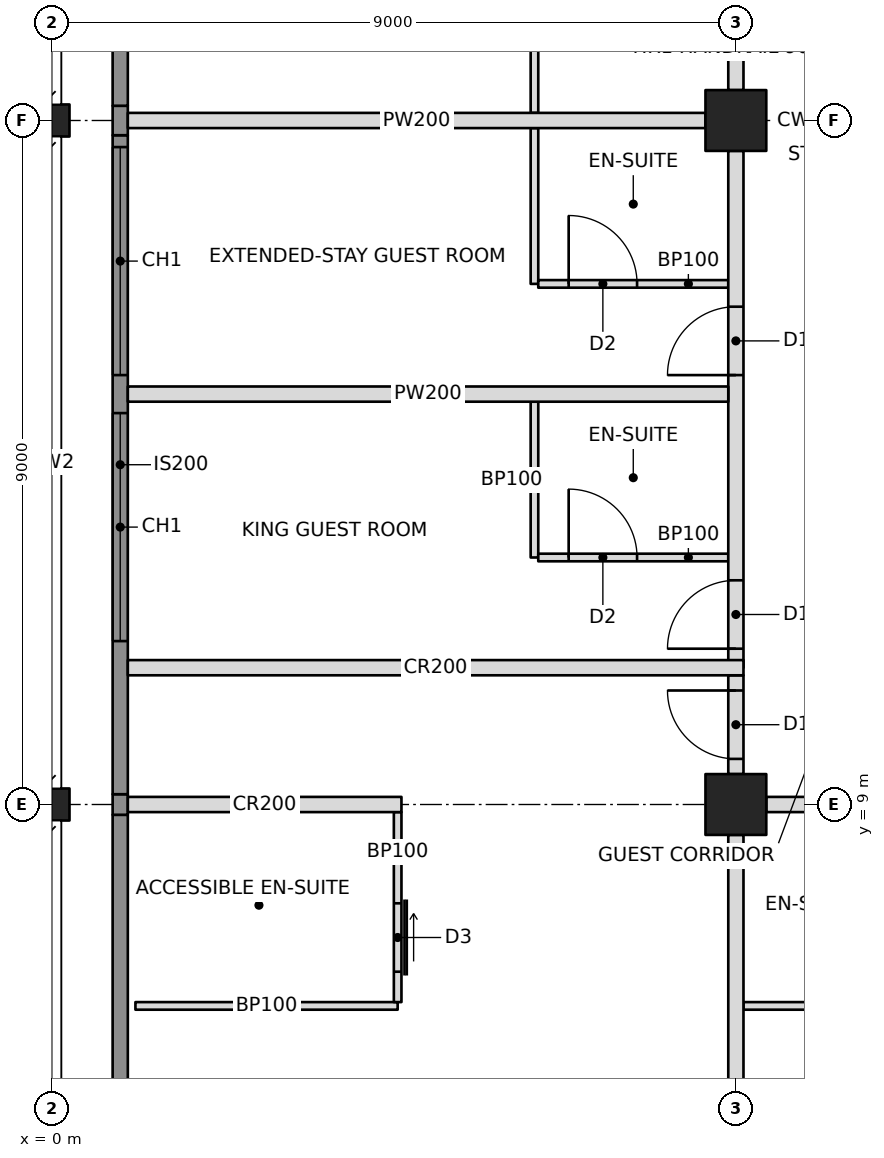
"""IFC4 building model, lengths in metres.
Left out: names, types, materials, properties, quantities, classifications, styles, units other than length and angle.
Written with IfcOpenShell. Run it as: python <this file> out.ifc"""

import sys

from ifc_helpers import new_model, si_unit, direction, frame, frame_2d, origin, origin_2d, place, context, subcontext, project, spatial, rectangle, hollow_rectangle, i_section, extrude, element, fill, save


model = new_model("IFC4")
c1 = context("Model", 3, precision=1e-05, world=origin(), true_north=direction((0.0, 1.0)))
c2 = subcontext(c1, "Body", "Model", "MODEL_VIEW")
j1 = project(units=[si_unit("LENGTHUNIT", "METRE"), si_unit("PLANEANGLEUNIT", "RADIAN")], contexts=[c1])
p1 = place(None, origin())
s1 = spatial("IfcSite", under=j1, at=p1, CompositionType="ELEMENT")
p2 = place(p1, origin())
s2 = spatial("IfcBuilding", under=s1, at=p2, CompositionType="ELEMENT")
p3 = place(p2, frame((0.0, 0.0, 237.4)))
s3 = spatial("IfcBuildingStorey", under=s2, at=p3, CompositionType="ELEMENT", Elevation=237.4)
for number, where, z_axis, x_axis in (
    (1, (0.0, 9.0, 0.0), (0.0, 0.0, 1.0), (0.0, 1.0, 0.0)),
    (2, (0.0, 18.0, 0.0), (0.0, 0.0, 1.0), (0.0, 1.0, 0.0)),
):
    element("IfcColumn", number, at=place(p3, frame(where, z_axis=z_axis, x_axis=x_axis)), inside=s3, PredefinedType="COLUMN", context=c2, shape_type="SweptSolid", body=[
        extrude(i_section(OverallWidth=0.422, OverallDepth=0.465, WebThickness=0.045, FlangeThickness=0.073, at=origin_2d()), origin(), (0.0, 0.0, 1.0), 3.6),
    ])
for number, where, z_axis, x_axis in (
    (3, (9.0, 9.0, 0.0), (0.0, 0.0, 1.0), (1.0, 0.0, 0.0)),
    (4, (9.0, 18.0, 0.0), (0.0, 0.0, 1.0), (1.0, 0.0, 0.0)),
):
    element("IfcColumn", number, at=place(p3, frame(where, z_axis=z_axis, x_axis=x_axis)), inside=s3, PredefinedType="COLUMN", context=c2, shape_type="SweptSolid", body=[
        extrude(hollow_rectangle(XDim=0.8, YDim=0.8, WallThickness=0.04, at=origin_2d()), origin(), (0.0, 0.0, 1.0), 3.6),
    ])
p4 = place(p3, frame((1.0, 9.0, 0.0), z_axis=(0.0, 0.0, 1.0), x_axis=(1.0, 0.0, 0.0)))
e5 = element("IfcWall", 5, at=p4, inside=s3, PredefinedType="PARTITIONING", context=c2, shape_type="SweptSolid", body=[
    extrude(rectangle(XDim=3.6, YDim=0.2, at=frame_2d((1.8, 0.0))), origin(), (0.0, 0.0, 1.0), 2.638),
])
p5 = place(p3, frame((9.4, 9.0, 0.0), z_axis=(0.0, 0.0, 1.0), x_axis=(1.0, 0.0, 0.0)))
e6 = element("IfcWall", 6, at=p5, inside=s3, PredefinedType="PARTITIONING", context=c2, shape_type="SweptSolid", body=[
    extrude(rectangle(XDim=8.2, YDim=0.2, at=frame_2d((4.1, 0.0))), origin(), (0.0, 0.0, 1.0), 2.605),
])
p6 = place(p5, frame((2.95, 0.0, 0.0)))
e7 = element("IfcOpeningElement", 7, at=p6, cuts=e6, PredefinedType="OPENING", context=c2, shape_type="SweptSolid", body=[
    extrude(rectangle(XDim=0.9, YDim=2.1, at=frame_2d((0.45, 1.05))), frame((0.0, 0.11, 0.0), z_axis=(0.0, -1.0, 0.0), x_axis=(1.0, 0.0, 0.0)), (0.0, 0.0, 1.0), 0.22),
])
p7 = place(p5, frame((4.35, 0.0, 0.0)))
e8 = element("IfcOpeningElement", 8, at=p7, cuts=e6, PredefinedType="OPENING", context=c2, shape_type="SweptSolid", body=[
    extrude(rectangle(XDim=0.9, YDim=2.1, at=frame_2d((0.45, 1.05))), frame((0.0, 0.11, 0.0), z_axis=(0.0, -1.0, 0.0), x_axis=(1.0, 0.0, 0.0)), (0.0, 0.0, 1.0), 0.22),
])
p8 = place(p3, frame((9.0, 10.8, 0.0), z_axis=(0.0, 0.0, 1.0), x_axis=(0.0, 1.0, 0.0)))
e9 = element("IfcWall", 9, at=p8, inside=s3, PredefinedType="PARTITIONING", context=c2, shape_type="SweptSolid", body=[
    extrude(rectangle(XDim=6.8, YDim=0.2, at=frame_2d((3.4, 0.0))), origin(), (0.0, 0.0, 1.0), 2.605),
])
p9 = place(p8, frame((0.25, 0.0, 0.0)))
e10 = element("IfcOpeningElement", 10, at=p9, cuts=e9, PredefinedType="OPENING", context=c2, shape_type="SweptSolid", body=[
    extrude(rectangle(XDim=0.9, YDim=2.1, at=frame_2d((0.45, 1.05))), frame((0.0, 0.11, 0.0), z_axis=(0.0, -1.0, 0.0), x_axis=(1.0, 0.0, 0.0)), (0.0, 0.0, 1.0), 0.22),
])
p10 = place(p8, frame((3.85, 0.0, 0.0)))
e11 = element("IfcOpeningElement", 11, at=p10, cuts=e9, PredefinedType="OPENING", context=c2, shape_type="SweptSolid", body=[
    extrude(rectangle(XDim=0.9, YDim=2.1, at=frame_2d((0.45, 1.05))), frame((0.0, 0.11, 0.0), z_axis=(0.0, -1.0, 0.0), x_axis=(1.0, 0.0, 0.0)), (0.0, 0.0, 1.0), 0.22),
])
p11 = place(p3, frame((9.0, 18.4, 0.0), z_axis=(0.0, 0.0, 1.0), x_axis=(0.0, 1.0, 0.0)))
e12 = element("IfcWall", 12, at=p11, inside=s3, PredefinedType="PARTITIONING", context=c2, shape_type="SweptSolid", body=[
    extrude(rectangle(XDim=6.8, YDim=0.2, at=frame_2d((3.4, 0.0))), origin(), (0.0, 0.0, 1.0), 2.605),
])
p12 = place(p11, frame((5.65, 0.0, 0.0)))
e13 = element("IfcOpeningElement", 13, at=p12, cuts=e12, PredefinedType="OPENING", context=c2, shape_type="SweptSolid", body=[
    extrude(rectangle(XDim=0.9, YDim=2.1, at=frame_2d((0.45, 1.05))), frame((0.0, 0.11, 0.0), z_axis=(0.0, -1.0, 0.0), x_axis=(1.0, 0.0, 0.0)), (0.0, 0.0, 1.0), 0.22),
])
p13 = place(p3, frame((1.0, 10.8, 0.0), z_axis=(0.0, 0.0, 1.0), x_axis=(1.0, 0.0, 0.0)))
e14 = element("IfcWall", 14, at=p13, inside=s3, PredefinedType="PARTITIONING", context=c2, shape_type="SweptSolid", body=[
    extrude(rectangle(XDim=8.1, YDim=0.2, at=frame_2d((4.05, 0.0))), origin(), (0.0, 0.0, 1.0), 2.604),
])
p14 = place(p3, frame((9.0, 8.6, 0.0), z_axis=(0.0, 0.0, 1.0), x_axis=(0.0, -1.0, 0.0)))
e15 = element("IfcWall", 15, at=p14, inside=s3, PredefinedType="PARTITIONING", context=c2, shape_type="SweptSolid", body=[
    extrude(rectangle(XDim=7.6, YDim=0.2, at=frame_2d((3.8, 0.0))), origin(), (0.0, 0.0, 1.0), 2.638),
])
p15 = place(p3, frame((1.1, 6.35, 0.0), z_axis=(0.0, 0.0, 1.0), x_axis=(1.0, 0.0, 0.0)))
e16 = element("IfcWall", 16, at=p15, inside=s3, PredefinedType="PARTITIONING", context=c2, shape_type="SweptSolid", body=[
    extrude(rectangle(XDim=3.45, YDim=0.1, at=frame_2d((1.725, 0.0))), origin(), (0.0, 0.0, 1.0), 3.4),
])
p16 = place(p3, frame((4.55, 8.9, 0.0), z_axis=(0.0, 0.0, 1.0), x_axis=(0.0, -1.0, 0.0)))
e17 = element("IfcWall", 17, at=p16, inside=s3, PredefinedType="PARTITIONING", context=c2, shape_type="SweptSolid", body=[
    extrude(rectangle(XDim=2.5, YDim=0.1, at=frame_2d((1.25, 0.0))), origin(), (0.0, 0.0, 1.0), 2.638),
])
p17 = place(p16, frame((1.2, 0.0, 0.0)))
e18 = element("IfcOpeningElement", 18, at=p17, cuts=e17, PredefinedType="OPENING", context=c2, shape_type="SweptSolid", body=[
    extrude(rectangle(XDim=0.9, YDim=2.1, at=frame_2d((0.45, 1.05))), frame((0.0, 0.06, 0.0), z_axis=(0.0, -1.0, 0.0), x_axis=(1.0, 0.0, 0.0)), (0.0, 0.0, 1.0), 0.12),
])
p18 = place(p3, frame((9.1, 6.35, 0.0), z_axis=(0.0, 0.0, 1.0), x_axis=(1.0, 0.0, 0.0)))
e19 = element("IfcWall", 19, at=p18, inside=s3, PredefinedType="PARTITIONING", context=c2, shape_type="SweptSolid", body=[
    extrude(rectangle(XDim=2.95, YDim=0.1, at=frame_2d((1.475, 0.0))), origin(), (0.0, 0.0, 1.0), 2.638),
])
p19 = place(p3, frame((8.9, 14.4, 0.0), z_axis=(0.0, 0.0, 1.0), x_axis=(-1.0, 0.0, 0.0)))
e20 = element("IfcWall", 20, at=p19, inside=s3, PredefinedType="PARTITIONING", context=c2, shape_type="SweptSolid", body=[
    extrude(rectangle(XDim=7.9, YDim=0.2, at=frame_2d((3.95, 0.0))), origin(), (0.0, 0.0, 1.0), 2.604),
])
p20 = place(p3, frame((8.6, 18.0, 0.0), z_axis=(0.0, 0.0, 1.0), x_axis=(-1.0, 0.0, 0.0)))
e21 = element("IfcWall", 21, at=p20, inside=s3, PredefinedType="PARTITIONING", context=c2, shape_type="SweptSolid", body=[
    extrude(rectangle(XDim=7.6, YDim=0.2, at=frame_2d((3.8, 0.0))), origin(), (0.0, 0.0, 1.0), 2.605),
])
p21 = place(p3, frame((6.35, 12.25, 0.0), z_axis=(0.0, 0.0, 1.0), x_axis=(0.0, 1.0, 0.0)))
e22 = element("IfcWall", 22, at=p21, inside=s3, PredefinedType="PARTITIONING", context=c2, shape_type="SweptSolid", body=[
    extrude(rectangle(XDim=2.05, YDim=0.1, at=frame_2d((1.025, 0.0))), origin(), (0.0, 0.0, 1.0), 3.4),
])
p22 = place(p3, frame((8.9, 12.25, 0.0), z_axis=(0.0, 0.0, 1.0), x_axis=(-1.0, 0.0, 0.0)))
e23 = element("IfcWall", 23, at=p22, inside=s3, PredefinedType="PARTITIONING", context=c2, shape_type="SweptSolid", body=[
    extrude(rectangle(XDim=2.5, YDim=0.1, at=frame_2d((1.25, 0.0))), origin(), (0.0, 0.0, 1.0), 2.604),
])
p23 = place(p22, frame((1.2, 0.0, 0.0)))
e24 = element("IfcOpeningElement", 24, at=p23, cuts=e23, PredefinedType="OPENING", context=c2, shape_type="SweptSolid", body=[
    extrude(rectangle(XDim=0.9, YDim=2.1, at=frame_2d((0.45, 1.05))), frame((0.0, 0.06, 0.0), z_axis=(0.0, -1.0, 0.0), x_axis=(1.0, 0.0, 0.0)), (0.0, 0.0, 1.0), 0.12),
])
p24 = place(p3, frame((6.35, 15.85, 0.0), z_axis=(0.0, 0.0, 1.0), x_axis=(0.0, 1.0, 0.0)))
e25 = element("IfcWall", 25, at=p24, inside=s3, PredefinedType="PARTITIONING", context=c2, shape_type="SweptSolid", body=[
    extrude(rectangle(XDim=2.05, YDim=0.1, at=frame_2d((1.025, 0.0))), origin(), (0.0, 0.0, 1.0), 2.604),
])
p25 = place(p3, frame((8.9, 15.85, 0.0), z_axis=(0.0, 0.0, 1.0), x_axis=(-1.0, 0.0, 0.0)))
e26 = element("IfcWall", 26, at=p25, inside=s3, PredefinedType="PARTITIONING", context=c2, shape_type="SweptSolid", body=[
    extrude(rectangle(XDim=2.5, YDim=0.1, at=frame_2d((1.25, 0.0))), origin(), (0.0, 0.0, 1.0), 2.604),
])
p26 = place(p25, frame((1.2, 0.0, 0.0)))
e27 = element("IfcOpeningElement", 27, at=p26, cuts=e26, PredefinedType="OPENING", context=c2, shape_type="SweptSolid", body=[
    extrude(rectangle(XDim=0.9, YDim=2.1, at=frame_2d((0.45, 1.05))), frame((0.0, 0.06, 0.0), z_axis=(0.0, -1.0, 0.0), x_axis=(1.0, 0.0, 0.0)), (0.0, 0.0, 1.0), 0.12),
])
p27 = place(p3, frame((6.35, 18.1, 0.0), z_axis=(0.0, 0.0, 1.0), x_axis=(0.0, 1.0, 0.0)))
e28 = element("IfcWall", 28, at=p27, inside=s3, PredefinedType="PARTITIONING", context=c2, shape_type="SweptSolid", body=[
    extrude(rectangle(XDim=3.45, YDim=0.1, at=frame_2d((1.725, 0.0))), origin(), (0.0, 0.0, 1.0), 2.604),
])
p28 = place(p3, frame((9.0, 9.4, 0.0), z_axis=(0.0, 0.0, 1.0), x_axis=(0.0, 1.0, 0.0)))
e29 = element("IfcWall", 29, at=p28, inside=s3, PredefinedType="PARTITIONING", context=c2, shape_type="SweptSolid", body=[
    extrude(rectangle(XDim=1.3, YDim=0.2, at=frame_2d((0.65, 0.0))), origin(), (0.0, 0.0, 1.0), 2.605),
])
p29 = place(p28, frame((0.2, 0.0, 0.0)))
e30 = element("IfcOpeningElement", 30, at=p29, cuts=e29, PredefinedType="OPENING", context=c2, shape_type="SweptSolid", body=[
    extrude(rectangle(XDim=0.9, YDim=2.1, at=frame_2d((0.45, 1.05))), frame((0.0, 0.11, 0.0), z_axis=(0.0, -1.0, 0.0), x_axis=(1.0, 0.0, 0.0)), (0.0, 0.0, 1.0), 0.22),
])
p30 = place(p3, frame((0.9, 4.607, 0.0), z_axis=(0.0, 0.0, 1.0), x_axis=(0.0, 1.0, 0.0)))
e31 = element("IfcWall", 31, at=p30, inside=s3, PredefinedType="SOLIDWALL", context=c2, shape_type="SweptSolid", body=[
    extrude(rectangle(XDim=4.257, YDim=0.2, at=frame_2d((2.129, 0.0))), origin(), (0.0, 0.0, 1.0), 3.4),
])
p31 = place(p3, frame((0.9, 8.865, 0.0), z_axis=(0.0, 0.0, 1.0), x_axis=(0.0, 1.0, 0.0)))
e32 = element("IfcWall", 32, at=p31, inside=s3, PredefinedType="SOLIDWALL", context=c2, shape_type="SweptSolid", body=[
    extrude(rectangle(XDim=0.271, YDim=0.2, at=frame_2d((0.135, 0.0))), origin(), (0.0, 0.0, 1.0), 2.638),
])
p32 = place(p3, frame((0.9, 9.135, 0.0), z_axis=(0.0, 0.0, 1.0), x_axis=(0.0, 1.0, 0.0)))
e33 = element("IfcWall", 33, at=p32, inside=s3, PredefinedType="SOLIDWALL", context=c2, shape_type="SweptSolid", body=[
    extrude(rectangle(XDim=8.671, YDim=0.2, at=frame_2d((4.335, 0.0))), origin(), (0.0, 0.0, 1.0), 3.4),
])
p33 = place(p32, frame((2.015, 0.0, 0.6)))
e34 = element("IfcOpeningElement", 34, at=p33, cuts=e33, PredefinedType="OPENING", context=c2, shape_type="SweptSolid", body=[
    extrude(rectangle(XDim=3.0, YDim=2.2, at=frame_2d((1.5, 1.1))), frame((0.0, 0.11, 0.0), z_axis=(0.0, -1.0, 0.0), x_axis=(1.0, 0.0, 0.0)), (0.0, 0.0, 1.0), 0.22),
])
p34 = place(p32, frame((5.515, 0.0, 0.6)))
e35 = element("IfcOpeningElement", 35, at=p34, cuts=e33, PredefinedType="OPENING", context=c2, shape_type="SweptSolid", body=[
    extrude(rectangle(XDim=3.0, YDim=2.2, at=frame_2d((1.5, 1.1))), frame((0.0, 0.11, 0.0), z_axis=(0.0, -1.0, 0.0), x_axis=(1.0, 0.0, 0.0)), (0.0, 0.0, 1.0), 0.22),
])
p35 = place(p3, frame((0.9, 17.806, 0.0), z_axis=(0.0, 0.0, 1.0), x_axis=(0.0, 1.0, 0.0)))
e36 = element("IfcWall", 36, at=p35, inside=s3, PredefinedType="SOLIDWALL", context=c2, shape_type="SweptSolid", body=[
    extrude(rectangle(XDim=0.388, YDim=0.2, at=frame_2d((0.194, 0.0))), origin(), (0.0, 0.0, 1.0), 2.604),
])
p36 = place(p3, frame((0.9, 18.194, 0.0), z_axis=(0.0, 0.0, 1.0), x_axis=(0.0, 1.0, 0.0)))
e37 = element("IfcWall", 37, at=p36, inside=s3, PredefinedType="SOLIDWALL", context=c2, shape_type="SweptSolid", body=[
    extrude(rectangle(XDim=5.806, YDim=0.2, at=frame_2d((2.903, 0.0))), origin(), (0.0, 0.0, 1.0), 3.4),
])
p37 = place(p36, frame((1.356, 0.0, 0.6)))
e38 = element("IfcOpeningElement", 38, at=p37, cuts=e37, PredefinedType="OPENING", context=c2, shape_type="SweptSolid", body=[
    extrude(rectangle(XDim=3.0, YDim=2.2, at=frame_2d((1.5, 1.1))), frame((0.0, 0.11, 0.0), z_axis=(0.0, -1.0, 0.0), x_axis=(1.0, 0.0, 0.0)), (0.0, 0.0, 1.0), 0.22),
])
p38 = place(p33, origin())
e39 = element("IfcWindow", 39, at=p38, inside=s3, PartitioningType="TRIPLE_PANEL_VERTICAL", PredefinedType="WINDOW", context=c2, shape_type="SweptSolid", body=[
    extrude(rectangle(XDim=3.0, YDim=2.2, at=frame_2d((1.5, 1.1))), frame((0.0, 0.03, 0.0), z_axis=(0.0, -1.0, 0.0), x_axis=(1.0, 0.0, 0.0)), (0.0, 0.0, 1.0), 0.06),
])
fill(e34, e39)
p39 = place(p34, origin())
e40 = element("IfcWindow", 40, at=p39, inside=s3, PartitioningType="TRIPLE_PANEL_VERTICAL", PredefinedType="WINDOW", context=c2, shape_type="SweptSolid", body=[
    extrude(rectangle(XDim=3.0, YDim=2.2, at=frame_2d((1.5, 1.1))), frame((0.0, 0.03, 0.0), z_axis=(0.0, -1.0, 0.0), x_axis=(1.0, 0.0, 0.0)), (0.0, 0.0, 1.0), 0.06),
])
fill(e35, e40)
p40 = place(p17, origin())
e41 = element("IfcDoor", 41, at=p40, inside=s3, OperationType="SLIDING_TO_LEFT", PredefinedType="DOOR", context=c2, shape_type="SweptSolid", body=[
    extrude(rectangle(XDim=0.9, YDim=2.1, at=frame_2d((0.45, 1.05))), frame((0.0, 0.025, 0.0), z_axis=(0.0, -1.0, 0.0), x_axis=(1.0, 0.0, 0.0)), (0.0, 0.0, 1.0), 0.05),
])
fill(e18, e41)
p41 = place(p23, frame((0.9, 0.0, 0.0), z_axis=(0.0, 0.0, 1.0), x_axis=(-1.0, 0.0, 0.0)))
e42 = element("IfcDoor", 42, at=p41, inside=s3, OperationType="SINGLE_SWING_LEFT", PredefinedType="DOOR", context=c2, shape_type="SweptSolid", body=[
    extrude(rectangle(XDim=0.9, YDim=2.1, at=frame_2d((0.45, 1.05))), frame((0.0, 0.025, 0.0), z_axis=(0.0, -1.0, 0.0), x_axis=(1.0, 0.0, 0.0)), (0.0, 0.0, 1.0), 0.05),
])
fill(e24, e42)
p42 = place(p9, origin())
e43 = element("IfcDoor", 43, at=p42, inside=s3, OperationType="SINGLE_SWING_LEFT", PredefinedType="DOOR", context=c2, shape_type="SweptSolid", body=[
    extrude(rectangle(XDim=0.9, YDim=2.1, at=frame_2d((0.45, 1.05))), frame((0.0, 0.025, 0.0), z_axis=(0.0, -1.0, 0.0), x_axis=(1.0, 0.0, 0.0)), (0.0, 0.0, 1.0), 0.05),
])
fill(e10, e43)
p43 = place(p26, frame((0.9, 0.0, 0.0), z_axis=(0.0, 0.0, 1.0), x_axis=(-1.0, 0.0, 0.0)))
e44 = element("IfcDoor", 44, at=p43, inside=s3, OperationType="SINGLE_SWING_LEFT", PredefinedType="DOOR", context=c2, shape_type="SweptSolid", body=[
    extrude(rectangle(XDim=0.9, YDim=2.1, at=frame_2d((0.45, 1.05))), frame((0.0, 0.025, 0.0), z_axis=(0.0, -1.0, 0.0), x_axis=(1.0, 0.0, 0.0)), (0.0, 0.0, 1.0), 0.05),
])
fill(e27, e44)
p44 = place(p10, origin())
e45 = element("IfcDoor", 45, at=p44, inside=s3, OperationType="SINGLE_SWING_LEFT", PredefinedType="DOOR", context=c2, shape_type="SweptSolid", body=[
    extrude(rectangle(XDim=0.9, YDim=2.1, at=frame_2d((0.45, 1.05))), frame((0.0, 0.025, 0.0), z_axis=(0.0, -1.0, 0.0), x_axis=(1.0, 0.0, 0.0)), (0.0, 0.0, 1.0), 0.05),
])
fill(e11, e45)
p45 = place(p29, origin())
e46 = element("IfcDoor", 46, at=p45, inside=s3, OperationType="SINGLE_SWING_RIGHT", PredefinedType="DOOR", context=c2, shape_type="SweptSolid", body=[
    extrude(rectangle(XDim=0.9, YDim=2.1, at=frame_2d((0.45, 1.05))), frame((0.0, 0.025, 0.0), z_axis=(0.0, -1.0, 0.0), x_axis=(1.0, 0.0, 0.0)), (0.0, 0.0, 1.0), 0.05),
])
fill(e30, e46)
save(model, sys.argv[1])
